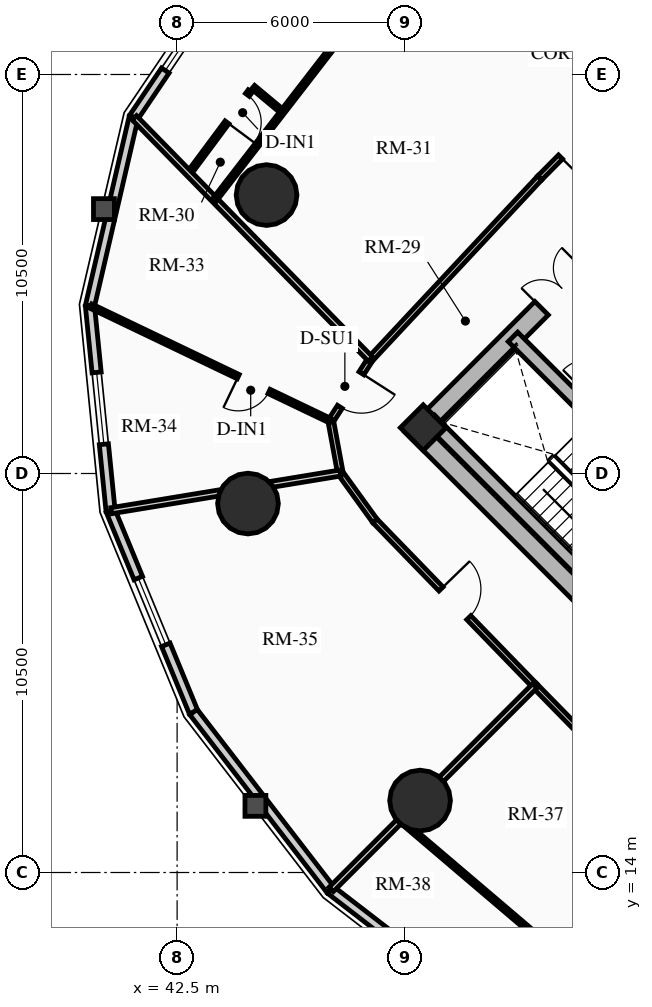
"""IFC4 building model, lengths in metres.
Left out: names, types, materials, properties, quantities, classifications, styles, units other than length and angle.
Written with IfcOpenShell. Run it as: python <this file> out.ifc"""

import sys

from ifc_helpers import new_model, si_unit, direction, frame, frame_2d, origin, origin_2d, place, context, subcontext, project, spatial, rectangle, circle, extrude, source, transform, mapped, element, fill, save


model = new_model("IFC4")
c1 = context("Model", 3, precision=1e-05, world=origin(), true_north=direction((0.0, 1.0)))
c2 = subcontext(c1, "Body", "Model", "MODEL_VIEW")
j1 = project(units=[si_unit("LENGTHUNIT", "METRE"), si_unit("PLANEANGLEUNIT", "RADIAN")], contexts=[c1])
p1 = place(None, origin())
s1 = spatial("IfcSite", under=j1, at=p1, CompositionType="ELEMENT")
p2 = place(p1, origin())
s2 = spatial("IfcBuilding", under=s1, at=p2, CompositionType="ELEMENT")
p3 = place(p2, frame((0.0, 0.0, 42.37)))
s3 = spatial("IfcBuildingStorey", under=s2, at=p3, CompositionType="ELEMENT", Elevation=42.37)
p4 = place(p3, frame((58.773, 15.661, 0.0), z_axis=(0.0, 0.0, 1.0), x_axis=(-0.707106781187, 0.707106781187, 0.0)))
e1 = element("IfcWall", 1, at=p4, inside=s3, PredefinedType="SHEAR", context=c2, shape_type="SweptSolid", body=[
    extrude(rectangle(XDim=14.3, YDim=0.5, at=frame_2d((7.15, 0.0))), origin(), (0.0, 0.0, 1.0), 2.91),
])
p5 = place(p3, frame((48.838, 25.596, 0.0), z_axis=(0.0, 0.0, 1.0), x_axis=(0.707106781187, 0.707106781187, 0.0)))
e2 = element("IfcWall", 2, at=p5, inside=s3, PredefinedType="SHEAR", context=c2, shape_type="SweptSolid", body=[
    extrude(rectangle(XDim=10.7, YDim=0.5, at=frame_2d((5.35, 0.0))), origin(), (0.0, 0.0, 1.0), 2.91),
])
m1 = source(origin(), c2, "Body", "SweptSolid", [
    extrude(rectangle(XDim=1.5, YDim=2.02, at=frame_2d((0.75, 1.01))), frame((0.0, 0.26, 0.0), z_axis=(0.0, -1.0, 0.0), x_axis=(1.0, 0.0, 0.0)), (0.0, 0.0, 1.0), 0.52),
])
p6 = place(p5, frame((4.6, 0.0, 0.0)))
e3 = element("IfcOpeningElement", 3, at=p6, cuts=e2, PredefinedType="OPENING", context=c2, shape_type="MappedRepresentation", body=[
    mapped(m1, transform((0.0, 0.0, 0.0), x_axis=(1.0, 0.0, 0.0), y_axis=(0.0, 1.0, 0.0), z_axis=(0.0, 0.0, 1.0), scale=1.0)),
])
p7 = place(p3, frame((61.096, 18.338, 0.0), z_axis=(0.0, 0.0, 1.0), x_axis=(-0.707106781187, 0.707106781187, 0.0)))
e4 = element("IfcWall", 4, at=p7, inside=s3, PredefinedType="SHEAR", context=c2, shape_type="SweptSolid", body=[
    extrude(rectangle(XDim=13.8, YDim=0.35, at=frame_2d((6.9, 0.0))), origin(), (0.0, 0.0, 1.0), 2.91),
])
m2 = source(origin(), c2, "Body", "SweptSolid", [
    extrude(rectangle(XDim=1.1, YDim=2.015, at=frame_2d((0.55, 1.007))), frame((0.0, 0.185, 0.0), z_axis=(0.0, -1.0, 0.0), x_axis=(1.0, 0.0, 0.0)), (0.0, 0.0, 1.0), 0.37),
])
p8 = place(p7, frame((4.9, 0.0, 0.0)))
e5 = element("IfcOpeningElement", 5, at=p8, cuts=e4, PredefinedType="OPENING", context=c2, shape_type="MappedRepresentation", body=[
    mapped(m2, transform((0.0, 0.0, 0.0), x_axis=(1.0, 0.0, 0.0), y_axis=(0.0, 1.0, 0.0), z_axis=(0.0, 0.0, 1.0), scale=1.0)),
])
m3 = source(origin(), c2, "Body", "SweptSolid", [
    extrude(rectangle(XDim=1.15, YDim=2.02, at=frame_2d((0.575, 1.01))), frame((0.0, 0.185, 0.0), z_axis=(0.0, -1.0, 0.0), x_axis=(1.0, 0.0, 0.0)), (0.0, 0.0, 1.0), 0.37),
])
p9 = place(p7, frame((7.32, 0.0, 0.0)))
e6 = element("IfcOpeningElement", 6, at=p9, cuts=e4, PredefinedType="OPENING", context=c2, shape_type="MappedRepresentation", body=[
    mapped(m3, transform((0.0, 0.0, 0.0), x_axis=(1.0, 0.0, 0.0), y_axis=(0.0, 1.0, 0.0), z_axis=(0.0, 0.0, 1.0), scale=1.0)),
])
p10 = place(p3, frame((53.922, 21.141, 0.0), z_axis=(0.0, 0.0, 1.0), x_axis=(-0.707106781187, 0.707106781187, 0.0)))
e7 = element("IfcWall", 7, at=p10, inside=s3, PredefinedType="SHEAR", context=c2, shape_type="SweptSolid", body=[
    extrude(rectangle(XDim=6.745, YDim=0.35, at=frame_2d((3.373, 0.0))), origin(), (0.0, 0.0, 1.0), 2.91),
])
p11 = place(p3, frame((48.976, 25.706, 0.0), z_axis=(0.0, 0.0, 1.0), x_axis=(0.707106781187, 0.707106781187, 0.0)))
e8 = element("IfcColumn", 8, at=p11, inside=s3, PredefinedType="COLUMN", context=c2, shape_type="SweptSolid", body=[
    extrude(rectangle(XDim=0.85, YDim=0.85, at=origin_2d()), origin(), (0.0, 0.0, 1.0), 2.91),
])
for number, where, z_axis, x_axis in (
    (9, (44.854, 31.827, 0.0), (0.0, 0.0, 1.0), (1.0, 0.0, 0.0)),
    (10, (44.365, 23.709, 0.0), (0.0, 0.0, 1.0), (1.0, 0.0, 0.0)),
    (11, (48.893, 15.893, 0.0), (0.0, 0.0, 1.0), (1.0, 0.0, 0.0)),
):
    element("IfcColumn", number, at=place(p3, frame(where, z_axis=z_axis, x_axis=x_axis)), inside=s3, PredefinedType="USERDEFINED", context=c2, shape_type="SweptSolid", body=[
        extrude(circle(Radius=0.8, at=origin_2d()), origin(), (0.0, 0.0, 1.0), 2.91),
    ])
p12 = place(p3, frame((41.356, 33.871, 0.0), z_axis=(0.0, 0.0, 1.0), x_axis=(0.559621532896, 0.828748297084, 0.0)))
e12 = element("IfcWall", 12, at=p12, inside=s3, PredefinedType="SOLIDWALL", context=c2, shape_type="SweptSolid", body=[
    extrude(rectangle(XDim=4.879, YDim=0.24, at=frame_2d((2.439, 0.0))), origin(), (0.0, 0.0, 1.0), 2.073),
])
m4 = source(origin(), c2, "Body", "SweptSolid", [
    extrude(rectangle(XDim=1.9, YDim=1.35, at=frame_2d((0.95, 0.675))), frame((0.0, 0.13, 0.0), z_axis=(0.0, -1.0, 0.0), x_axis=(1.0, 0.0, 0.0)), (0.0, 0.0, 1.0), 0.26),
])
p13 = place(p12, frame((1.489, 0.0, 0.65)))
e13 = element("IfcOpeningElement", 13, at=p13, cuts=e12, PredefinedType="OPENING", context=c2, shape_type="MappedRepresentation", body=[
    mapped(m4, transform((0.0, 0.0, 0.0), x_axis=(1.0, 0.0, 0.0), y_axis=(0.0, 1.0, 0.0), z_axis=(0.0, 0.0, 1.0), scale=1.0)),
])
p14 = place(p3, frame((40.206, 28.91, 0.0), z_axis=(0.0, 0.0, 1.0), x_axis=(0.22582585901, 0.974167686491, 0.0)))
e14 = element("IfcWall", 14, at=p14, inside=s3, PredefinedType="SOLIDWALL", context=c2, shape_type="SweptSolid", body=[
    extrude(rectangle(XDim=5.092, YDim=0.24, at=frame_2d((2.546, 0.0))), origin(), (0.0, 0.0, 1.0), 2.073),
])
p15 = place(p3, frame((40.749, 23.518, 0.0), z_axis=(0.0, 0.0, 1.0), x_axis=(-0.100190592135, 0.994968263437, 0.0)))
e15 = element("IfcWall", 15, at=p15, inside=s3, PredefinedType="SOLIDWALL", context=c2, shape_type="SweptSolid", body=[
    extrude(rectangle(XDim=5.419, YDim=0.24, at=frame_2d((2.71, 0.0))), origin(), (0.0, 0.0, 1.0), 2.073),
])
p16 = place(p15, frame((1.76, 0.0, 0.65)))
e16 = element("IfcOpeningElement", 16, at=p16, cuts=e15, PredefinedType="OPENING", context=c2, shape_type="MappedRepresentation", body=[
    mapped(m4, transform((0.0, 0.0, 0.0), x_axis=(1.0, 0.0, 0.0), y_axis=(0.0, 1.0, 0.0), z_axis=(0.0, 0.0, 1.0), scale=1.0)),
])
p17 = place(p3, frame((42.932, 18.222, 0.0), z_axis=(0.0, 0.0, 1.0), x_axis=(-0.381077764176, 0.924542988536, 0.0)))
e17 = element("IfcWall", 17, at=p17, inside=s3, PredefinedType="SOLIDWALL", context=c2, shape_type="SweptSolid", body=[
    extrude(rectangle(XDim=5.728, YDim=0.24, at=frame_2d((2.864, 0.0))), origin(), (0.0, 0.0, 1.0), 2.073),
])
p18 = place(p17, frame((1.914, 0.0, 0.65)))
e18 = element("IfcOpeningElement", 18, at=p18, cuts=e17, PredefinedType="OPENING", context=c2, shape_type="MappedRepresentation", body=[
    mapped(m4, transform((0.0, 0.0, 0.0), x_axis=(1.0, 0.0, 0.0), y_axis=(0.0, 1.0, 0.0), z_axis=(0.0, 0.0, 1.0), scale=1.0)),
])
p19 = place(p3, frame((46.541, 13.541, 0.0), z_axis=(0.0, 0.0, 1.0), x_axis=(-0.610494906082, 0.792020182601, 0.0)))
e19 = element("IfcWall", 19, at=p19, inside=s3, PredefinedType="SOLIDWALL", context=c2, shape_type="SweptSolid", body=[
    extrude(rectangle(XDim=5.911, YDim=0.24, at=frame_2d((2.956, 0.0))), origin(), (0.0, 0.0, 1.0), 2.073),
])
p20 = place(p3, frame((51.222, 9.932, 0.0), z_axis=(0.0, 0.0, 1.0), x_axis=(-0.792020182601, 0.610494906082, 0.0)))
e20 = element("IfcWall", 20, at=p20, inside=s3, PredefinedType="SOLIDWALL", context=c2, shape_type="SweptSolid", body=[
    extrude(rectangle(XDim=5.911, YDim=0.24, at=frame_2d((2.956, 0.0))), origin(), (0.0, 0.0, 1.0), 2.073),
])
p21 = place(p20, frame((2.005, 0.0, 0.65)))
e21 = element("IfcOpeningElement", 21, at=p21, cuts=e20, PredefinedType="OPENING", context=c2, shape_type="MappedRepresentation", body=[
    mapped(m4, transform((0.0, 0.0, 0.0), x_axis=(1.0, 0.0, 0.0), y_axis=(0.0, 1.0, 0.0), z_axis=(0.0, 0.0, 1.0), scale=1.0)),
])
p22 = place(p3, frame((54.427, 34.683, 0.0), z_axis=(0.0, 0.0, 1.0), x_axis=(-0.704178989986, -0.710022499687, 0.0)))
e22 = element("IfcWall", 22, at=p22, inside=s3, PredefinedType="PARTITIONING", context=c2, shape_type="SweptSolid", body=[
    extrude(rectangle(XDim=3.384, YDim=0.15, at=frame_2d((1.692, 0.0))), origin(), (0.0, 0.0, 1.0), 2.159),
])
m5 = source(origin(), c2, "Body", "SweptSolid", [
    extrude(rectangle(XDim=1.05, YDim=2.015, at=frame_2d((0.525, 1.007))), frame((0.0, 0.085, 0.0), z_axis=(0.0, -1.0, 0.0), x_axis=(1.0, 0.0, 0.0)), (0.0, 0.0, 1.0), 0.17),
])
p23 = place(p22, frame((1.56, 0.0, 0.0)))
e23 = element("IfcOpeningElement", 23, at=p23, cuts=e22, PredefinedType="OPENING", context=c2, shape_type="MappedRepresentation", body=[
    mapped(m5, transform((0.0, 0.0, 0.0), x_axis=(1.0, 0.0, 0.0), y_axis=(0.0, 1.0, 0.0), z_axis=(0.0, 0.0, 1.0), scale=1.0)),
])
p24 = place(p3, frame((52.043, 32.28, 0.0), z_axis=(0.0, 0.0, 1.0), x_axis=(-0.682606081633, -0.730786519661, 0.0)))
e24 = element("IfcWall", 24, at=p24, inside=s3, PredefinedType="PARTITIONING", context=c2, shape_type="SweptSolid", body=[
    extrude(rectangle(XDim=6.527, YDim=0.15, at=frame_2d((3.263, 0.0))), origin(), (0.0, 0.0, 1.0), 2.159),
])
p25 = place(p3, frame((47.588, 27.51, 0.0), z_axis=(0.0, 0.0, 1.0), x_axis=(-0.540202619347, -0.841534984449, 0.0)))
e25 = element("IfcWall", 25, at=p25, inside=s3, PredefinedType="PARTITIONING", context=c2, shape_type="SweptSolid", body=[
    extrude(rectangle(XDim=1.935, YDim=0.15, at=frame_2d((0.967, 0.0))), origin(), (0.0, 0.0, 1.0), 2.159),
])
p26 = place(p25, frame((0.442, 0.0, 0.0)))
e26 = element("IfcOpeningElement", 26, at=p26, cuts=e25, PredefinedType="OPENING", context=c2, shape_type="MappedRepresentation", body=[
    mapped(m5, transform((0.0, 0.0, 0.0), x_axis=(1.0, 0.0, 0.0), y_axis=(0.0, 1.0, 0.0), z_axis=(0.0, 0.0, 1.0), scale=1.0)),
])
p27 = place(p3, frame((46.543, 25.882, 0.0), z_axis=(0.0, 0.0, 1.0), x_axis=(0.181153502579, -0.983454832976, 0.0)))
e27 = element("IfcWall", 27, at=p27, inside=s3, PredefinedType="PARTITIONING", context=c2, shape_type="SweptSolid", body=[
    extrude(rectangle(XDim=1.392, YDim=0.15, at=frame_2d((0.696, 0.0))), origin(), (0.0, 0.0, 1.0), 2.159),
])
p28 = place(p3, frame((46.795, 24.513, 0.0), z_axis=(0.0, 0.0, 1.0), x_axis=(0.585628197524, -0.810579801294, 0.0)))
e28 = element("IfcWall", 28, at=p28, inside=s3, PredefinedType="PARTITIONING", context=c2, shape_type="SweptSolid", body=[
    extrude(rectangle(XDim=1.554, YDim=0.15, at=frame_2d((0.777, 0.0))), origin(), (0.0, 0.0, 1.0), 2.205),
])
p29 = place(p3, frame((47.706, 23.253, 0.0), z_axis=(0.0, 0.0, 1.0), x_axis=(0.696179266346, -0.717867974707, 0.0)))
e29 = element("IfcWall", 29, at=p29, inside=s3, PredefinedType="PARTITIONING", context=c2, shape_type="SweptSolid", body=[
    extrude(rectangle(XDim=6.045, YDim=0.15, at=frame_2d((3.022, 0.0))), origin(), (0.0, 0.0, 1.0), 2.635),
])
p30 = place(p29, frame((2.497, 0.0, 0.0)))
e30 = element("IfcOpeningElement", 30, at=p30, cuts=e29, PredefinedType="OPENING", context=c2, shape_type="MappedRepresentation", body=[
    mapped(m5, transform((0.0, 0.0, 0.0), x_axis=(1.0, 0.0, 0.0), y_axis=(0.0, 1.0, 0.0), z_axis=(0.0, 0.0, 1.0), scale=1.0)),
])
p31 = place(p3, frame((51.914, 18.914, 0.0), z_axis=(0.0, 0.0, 1.0), x_axis=(0.699999313799, -0.714143515465, 0.0)))
e31 = element("IfcWall", 31, at=p31, inside=s3, PredefinedType="PARTITIONING", context=c2, shape_type="SweptSolid", body=[
    extrude(rectangle(XDim=6.162, YDim=0.15, at=frame_2d((3.081, 0.0))), origin(), (0.0, 0.0, 1.0), 2.159),
])
p32 = place(p3, frame((47.588, 27.51, 0.0), z_axis=(0.0, 0.0, 1.0), x_axis=(-0.699371977892, 0.714757886657, 0.0)))
e32 = element("IfcWall", 32, at=p32, inside=s3, PredefinedType="PARTITIONING", context=c2, shape_type="SweptSolid", body=[
    extrude(rectangle(XDim=8.886, YDim=0.16, at=frame_2d((4.443, 0.0))), origin(), (0.0, 0.0, 1.0), 2.073),
])
p33 = place(p3, frame((46.795, 24.513, 0.0), z_axis=(0.0, 0.0, 1.0), x_axis=(-0.986729986004, -0.162369746937, 0.0)))
e33 = element("IfcWall", 33, at=p33, inside=s3, PredefinedType="PARTITIONING", context=c2, shape_type="SweptSolid", body=[
    extrude(rectangle(XDim=6.108, YDim=0.16, at=frame_2d((3.054, 0.0))), origin(), (0.0, 0.0, 1.0), 2.073),
])
p34 = place(p3, frame((51.914, 18.914, 0.0), z_axis=(0.0, 0.0, 1.0), x_axis=(-0.707106781187, -0.707106781187, 0.0)))
e34 = element("IfcWall", 34, at=p34, inside=s3, PredefinedType="PARTITIONING", context=c2, shape_type="SweptSolid", body=[
    extrude(rectangle(XDim=7.579, YDim=0.16, at=frame_2d((3.79, 0.0))), origin(), (0.0, 0.0, 1.0), 2.073),
])
p35 = place(p3, frame((46.801, 35.989, 0.0), z_axis=(0.0, 0.0, 1.0), x_axis=(-0.611635984749, -0.791139319058, 0.0)))
e35 = element("IfcWall", 35, at=p35, inside=s3, PredefinedType="PARTITIONING", context=c2, shape_type="SweptSolid", body=[
    extrude(rectangle(XDim=5.419, YDim=0.125, at=frame_2d((2.709, 0.0))), origin(), (0.0, 0.0, 1.0), 2.159),
])
p36 = place(p3, frame((45.204, 34.078, 0.0), z_axis=(0.0, 0.0, 1.0), x_axis=(-0.768330339969, 0.640053504547, 0.0)))
e36 = element("IfcWall", 36, at=p36, inside=s3, PredefinedType="PARTITIONING", context=c2, shape_type="SweptSolid", body=[
    extrude(rectangle(XDim=0.917, YDim=0.125, at=frame_2d((0.458, 0.0))), origin(), (0.0, 0.0, 1.0), 2.635),
])
p37 = place(p3, frame((44.421, 34.56, 0.0), z_axis=(0.0, 0.0, 1.0), x_axis=(-0.596454407051, -0.802646958699, 0.0)))
e37 = element("IfcWall", 37, at=p37, inside=s3, PredefinedType="PARTITIONING", context=c2, shape_type="SweptSolid", body=[
    extrude(rectangle(XDim=2.516, YDim=0.125, at=frame_2d((1.258, 0.0))), origin(), (0.0, 0.0, 1.0), 2.159),
])
m6 = source(origin(), c2, "Body", "SweptSolid", [
    extrude(rectangle(XDim=0.9, YDim=2.005, at=frame_2d((0.45, 1.002))), frame((0.0, 0.073, 0.0), z_axis=(0.0, -1.0, 0.0), x_axis=(1.0, 0.0, 0.0)), (0.0, 0.0, 1.0), 0.145),
])
p38 = place(p37, frame((0.12, 0.0, 0.0)))
e38 = element("IfcOpeningElement", 38, at=p38, cuts=e37, PredefinedType="OPENING", context=c2, shape_type="MappedRepresentation", body=[
    mapped(m6, transform((0.0, 0.0, 0.0), x_axis=(1.0, 0.0, 0.0), y_axis=(0.0, 1.0, 0.0), z_axis=(0.0, 0.0, 1.0), scale=1.0)),
])
p39 = place(p3, frame((46.543, 25.882, 0.0), z_axis=(0.0, 0.0, 1.0), x_axis=(-0.901937110034, 0.431867398103, 0.0)))
e39 = element("IfcWall", 39, at=p39, inside=s3, PredefinedType="PARTITIONING", context=c2, shape_type="SweptSolid", body=[
    extrude(rectangle(XDim=7.004, YDim=0.125, at=frame_2d((3.502, 0.0))), origin(), (0.0, 0.0, 1.0), 2.073),
])
p40 = place(p39, frame((1.8, 0.0, 0.0)))
e40 = element("IfcOpeningElement", 40, at=p40, cuts=e39, PredefinedType="OPENING", context=c2, shape_type="MappedRepresentation", body=[
    mapped(m6, transform((0.0, 0.0, 0.0), x_axis=(1.0, 0.0, 0.0), y_axis=(0.0, 1.0, 0.0), z_axis=(0.0, 0.0, 1.0), scale=1.0)),
])
p41 = place(p3, frame((48.377, 15.377, 0.0), z_axis=(0.0, 0.0, 1.0), x_axis=(0.761505943152, -0.648157927163, 0.0)))
e41 = element("IfcWall", 41, at=p41, inside=s3, PredefinedType="PARTITIONING", context=c2, shape_type="SweptSolid", body=[
    extrude(rectangle(XDim=5.979, YDim=0.125, at=frame_2d((2.99, 0.0))), origin(), (0.0, 0.0, 1.0), 2.635),
])
m7 = source(origin(), c2, "Body", "SweptSolid", [
    extrude(rectangle(XDim=1.9, YDim=1.35, at=frame_2d((0.95, 0.675))), frame((0.0, 0.03, 0.0), z_axis=(0.0, -1.0, 0.0), x_axis=(1.0, 0.0, 0.0)), (0.0, 0.0, 1.0), 0.06),
])
p42 = place(p13, origin())
e42 = element("IfcWindow", 42, at=p42, inside=s3, PartitioningType="DOUBLE_PANEL_VERTICAL", PredefinedType="WINDOW", context=c2, shape_type="MappedRepresentation", body=[
    mapped(m7, transform((0.0, 0.0, 0.0), x_axis=(1.0, 0.0, 0.0), y_axis=(0.0, 1.0, 0.0), z_axis=(0.0, 0.0, 1.0), scale=1.0)),
])
fill(e13, e42)
p43 = place(p16, origin())
e43 = element("IfcWindow", 43, at=p43, inside=s3, PartitioningType="DOUBLE_PANEL_VERTICAL", PredefinedType="WINDOW", context=c2, shape_type="MappedRepresentation", body=[
    mapped(m7, transform((0.0, 0.0, 0.0), x_axis=(1.0, 0.0, 0.0), y_axis=(0.0, 1.0, 0.0), z_axis=(0.0, 0.0, 1.0), scale=1.0)),
])
fill(e16, e43)
p44 = place(p18, origin())
e44 = element("IfcWindow", 44, at=p44, inside=s3, PartitioningType="DOUBLE_PANEL_VERTICAL", PredefinedType="WINDOW", context=c2, shape_type="MappedRepresentation", body=[
    mapped(m7, transform((0.0, 0.0, 0.0), x_axis=(1.0, 0.0, 0.0), y_axis=(0.0, 1.0, 0.0), z_axis=(0.0, 0.0, 1.0), scale=1.0)),
])
fill(e18, e44)
m8 = source(origin(), c2, "Body", "SweptSolid", [
    extrude(rectangle(XDim=1.5, YDim=2.02, at=frame_2d((0.75, 1.01))), frame((0.0, 0.025, 0.0), z_axis=(0.0, -1.0, 0.0), x_axis=(1.0, 0.0, 0.0)), (0.0, 0.0, 1.0), 0.05),
])
p45 = place(p6, origin())
e45 = element("IfcDoor", 45, at=p45, inside=s3, OperationType="DOUBLE_DOOR_SINGLE_SWING", PredefinedType="DOOR", context=c2, shape_type="MappedRepresentation", body=[
    mapped(m8, transform((0.0, 0.0, 0.0), x_axis=(1.0, 0.0, 0.0), y_axis=(0.0, 1.0, 0.0), z_axis=(0.0, 0.0, 1.0), scale=1.0)),
])
fill(e3, e45)
m9 = source(origin(), c2, "Body", "SweptSolid", [
    extrude(rectangle(XDim=1.05, YDim=2.015, at=frame_2d((0.525, 1.007))), frame((0.0, 0.025, 0.0), z_axis=(0.0, -1.0, 0.0), x_axis=(1.0, 0.0, 0.0)), (0.0, 0.0, 1.0), 0.05),
])
p46 = place(p23, origin())
e46 = element("IfcDoor", 46, at=p46, inside=s3, OperationType="SINGLE_SWING_RIGHT", PredefinedType="DOOR", context=c2, shape_type="MappedRepresentation", body=[
    mapped(m9, transform((0.0, 0.0, 0.0), x_axis=(1.0, 0.0, 0.0), y_axis=(0.0, 1.0, 0.0), z_axis=(0.0, 0.0, 1.0), scale=1.0)),
])
fill(e23, e46)
m10 = source(origin(), c2, "Body", "SweptSolid", [
    extrude(rectangle(XDim=0.9, YDim=2.005, at=frame_2d((0.45, 1.002))), frame((0.0, 0.025, 0.0), z_axis=(0.0, -1.0, 0.0), x_axis=(1.0, 0.0, 0.0)), (0.0, 0.0, 1.0), 0.05),
])
p47 = place(p38, origin())
e47 = element("IfcDoor", 47, at=p47, inside=s3, OperationType="SINGLE_SWING_RIGHT", PredefinedType="DOOR", context=c2, shape_type="MappedRepresentation", body=[
    mapped(m10, transform((0.0, 0.0, 0.0), x_axis=(1.0, 0.0, 0.0), y_axis=(0.0, 1.0, 0.0), z_axis=(0.0, 0.0, 1.0), scale=1.0)),
])
fill(e38, e47)
p48 = place(p26, origin())
e48 = element("IfcDoor", 48, at=p48, inside=s3, OperationType="SINGLE_SWING_LEFT", PredefinedType="DOOR", context=c2, shape_type="MappedRepresentation", body=[
    mapped(m9, transform((0.0, 0.0, 0.0), x_axis=(1.0, 0.0, 0.0), y_axis=(0.0, 1.0, 0.0), z_axis=(0.0, 0.0, 1.0), scale=1.0)),
])
fill(e26, e48)
p49 = place(p40, origin())
e49 = element("IfcDoor", 49, at=p49, inside=s3, OperationType="SINGLE_SWING_RIGHT", PredefinedType="DOOR", context=c2, shape_type="MappedRepresentation", body=[
    mapped(m10, transform((0.0, 0.0, 0.0), x_axis=(1.0, 0.0, 0.0), y_axis=(0.0, 1.0, 0.0), z_axis=(0.0, 0.0, 1.0), scale=1.0)),
])
fill(e40, e49)
p50 = place(p30, origin())
e50 = element("IfcDoor", 50, at=p50, inside=s3, OperationType="SINGLE_SWING_LEFT", PredefinedType="DOOR", context=c2, shape_type="MappedRepresentation", body=[
    mapped(m9, transform((0.0, 0.0, 0.0), x_axis=(1.0, 0.0, 0.0), y_axis=(0.0, 1.0, 0.0), z_axis=(0.0, 0.0, 1.0), scale=1.0)),
])
fill(e30, e50)
save(model, sys.argv[1])
